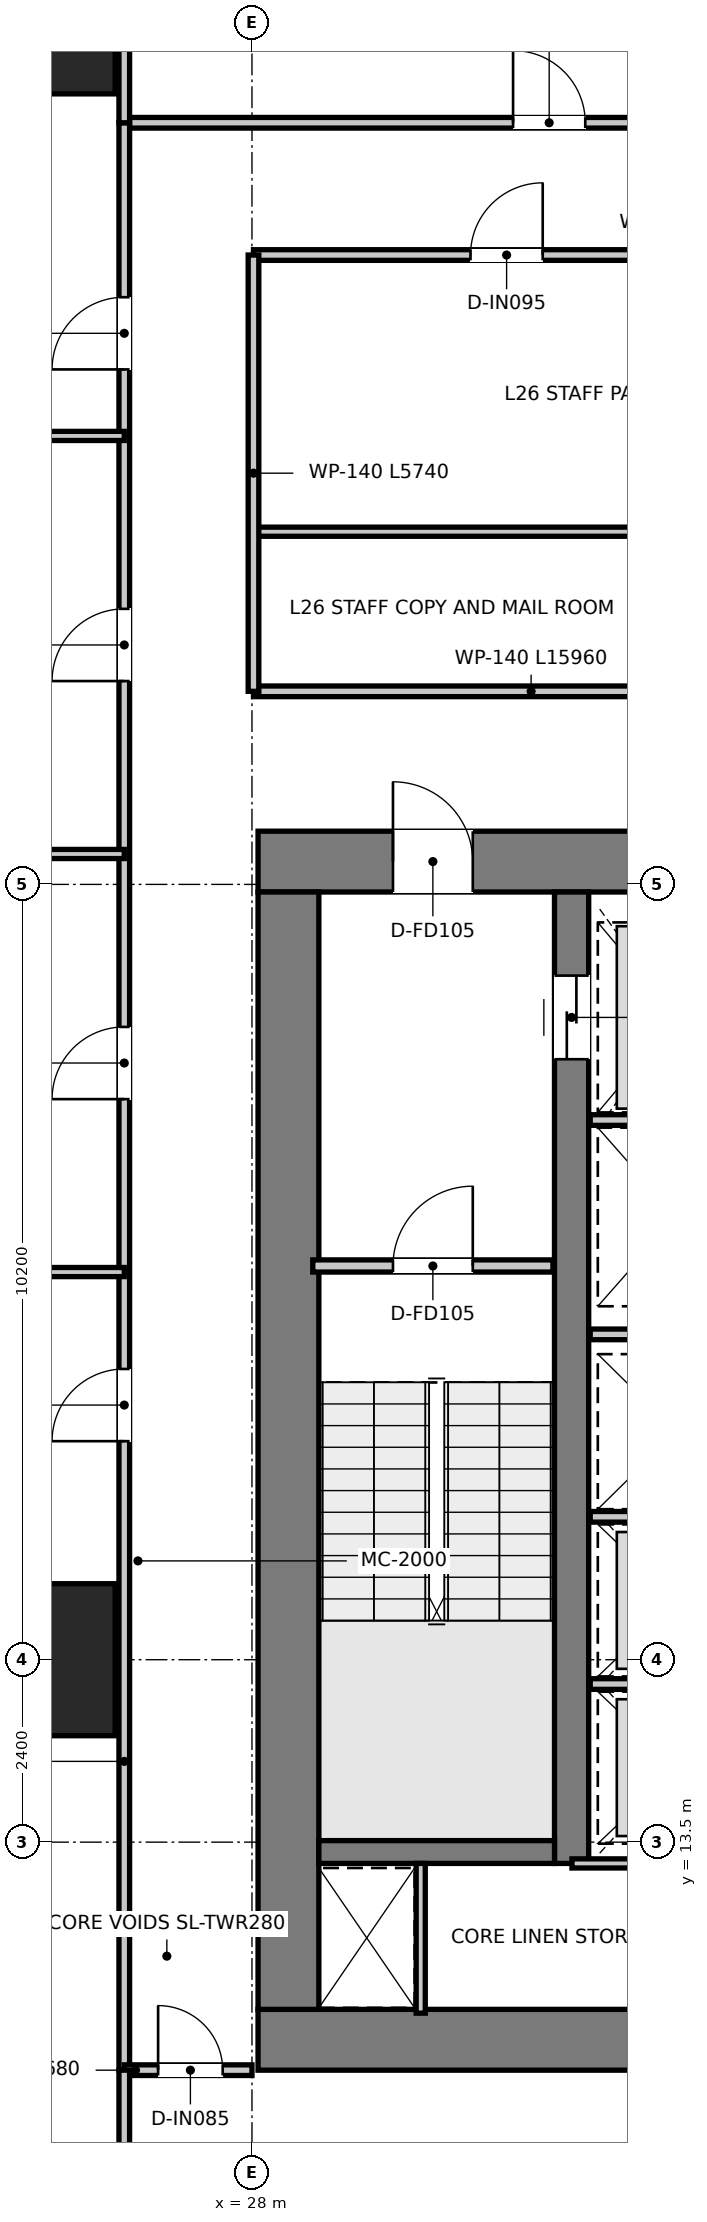
"""IFC4 building model, lengths in metres.
Left out: names, types, materials, properties, quantities, classifications, styles, units other than length and angle.
Written with IfcOpenShell. Run it as: python <this file> out.ifc"""

import sys

from ifc_helpers import new_model, si_unit, direction, frame, frame_2d, origin, origin_2d, place, context, subcontext, project, spatial, rectangle, extrude, source, transform, mapped, element, fill, save


model = new_model("IFC4")
c1 = context("Model", 3, precision=1e-05, world=origin(), true_north=direction((0.0, 1.0)))
c2 = subcontext(c1, "Body", "Model", "MODEL_VIEW")
j1 = project(units=[si_unit("LENGTHUNIT", "METRE"), si_unit("PLANEANGLEUNIT", "RADIAN")], contexts=[c1])
p1 = place(None, origin())
s1 = spatial("IfcSite", under=j1, at=p1, CompositionType="ELEMENT")
p2 = place(p1, origin())
s2 = spatial("IfcBuilding", under=s1, at=p2, CompositionType="ELEMENT")
p3 = place(p2, frame((0.0, 0.0, 109.8)))
s3 = spatial("IfcBuildingStorey", under=s2, at=p3, CompositionType="ELEMENT", Elevation=109.8)
p4 = place(p3, frame((28.08, 10.9, 0.0), z_axis=(0.0, 0.0, 1.0), x_axis=(1.0, 0.0, 0.0)))
e1 = element("IfcWall", 1, at=p4, inside=s3, PredefinedType="SHEAR", context=c2, shape_type="SweptSolid", body=[
    extrude(rectangle(XDim=15.84, YDim=0.8, at=frame_2d((7.92, 0.0))), origin(), (0.0, 0.0, 1.0), 3.95),
])
p5 = place(p3, frame((28.08, 26.4, 0.0), z_axis=(0.0, 0.0, 1.0), x_axis=(1.0, 0.0, 0.0)))
e2 = element("IfcWall", 2, at=p5, inside=s3, PredefinedType="SHEAR", context=c2, shape_type="SweptSolid", body=[
    extrude(rectangle(XDim=15.84, YDim=0.8, at=frame_2d((7.92, 0.0))), origin(), (0.0, 0.0, 1.0), 3.95),
])
p6 = place(p5, frame((7.22, 0.0, 0.0)))
e3 = element("IfcOpeningElement", 3, at=p6, cuts=e2, PredefinedType="OPENING", context=c2, shape_type="SweptSolid", body=[
    extrude(rectangle(XDim=1.4, YDim=2.2, at=frame_2d((0.7, 1.1))), frame((0.0, 0.41, 0.0), z_axis=(0.0, -1.0, 0.0), x_axis=(1.0, 0.0, 0.0)), (0.0, 0.0, 1.0), 0.82),
])
p7 = place(p5, frame((1.775, 0.0, 0.0)))
e4 = element("IfcOpeningElement", 4, at=p7, cuts=e2, PredefinedType="OPENING", context=c2, shape_type="SweptSolid", body=[
    extrude(rectangle(XDim=1.05, YDim=2.1, at=frame_2d((0.525, 1.05))), frame((0.0, 0.41, 0.0), z_axis=(0.0, -1.0, 0.0), x_axis=(1.0, 0.0, 0.0)), (0.0, 0.0, 1.0), 0.82),
])
p8 = place(p5, frame((13.015, 0.0, 0.0)))
e5 = element("IfcOpeningElement", 5, at=p8, cuts=e2, PredefinedType="OPENING", context=c2, shape_type="SweptSolid", body=[
    extrude(rectangle(XDim=1.05, YDim=2.1, at=frame_2d((0.525, 1.05))), frame((0.0, 0.41, 0.0), z_axis=(0.0, -1.0, 0.0), x_axis=(1.0, 0.0, 0.0)), (0.0, 0.0, 1.0), 0.82),
])
p9 = place(p3, frame((28.48, 11.3, 0.0), z_axis=(0.0, 0.0, 1.0), x_axis=(0.0, 1.0, 0.0)))
e6 = element("IfcWall", 6, at=p9, inside=s3, PredefinedType="SHEAR", context=c2, shape_type="SweptSolid", body=[
    extrude(rectangle(XDim=14.7, YDim=0.8, at=frame_2d((7.35, 0.0))), origin(), (0.0, 0.0, 1.0), 3.95),
])
p10 = place(p3, frame((32.205, 13.22, 0.0), z_axis=(0.0, 0.0, 1.0), x_axis=(0.0, 1.0, 0.0)))
e7 = element("IfcWall", 7, at=p10, inside=s3, PredefinedType="SHEAR", context=c2, shape_type="SweptSolid", body=[
    extrude(rectangle(XDim=12.78, YDim=0.45, at=frame_2d((6.39, 0.0))), origin(), (0.0, 0.0, 1.0), 3.95),
])
p11 = place(p10, frame((10.58, 0.0, 0.0)))
e8 = element("IfcOpeningElement", 8, at=p11, cuts=e7, PredefinedType="OPENING", context=c2, shape_type="SweptSolid", body=[
    extrude(rectangle(XDim=1.1, YDim=2.15, at=frame_2d((0.55, 1.075))), frame((0.0, 0.235, 0.0), z_axis=(0.0, -1.0, 0.0), x_axis=(1.0, 0.0, 0.0)), (0.0, 0.0, 1.0), 0.47),
])
p12 = place(p3, frame((28.88, 13.37, 0.0), z_axis=(0.0, 0.0, 1.0), x_axis=(1.0, 0.0, 0.0)))
e9 = element("IfcWall", 9, at=p12, inside=s3, PredefinedType="SHEAR", context=c2, shape_type="SweptSolid", body=[
    extrude(rectangle(XDim=3.1, YDim=0.3, at=frame_2d((1.55, 0.0))), origin(), (0.0, 0.0, 1.0), 3.95),
])
m1 = source(origin(), c2, "Body", "SweptSolid", [
    extrude(rectangle(XDim=2.0, YDim=2.0, at=origin_2d()), origin(), (0.0, 0.0, 1.0), 3.95),
])
for number, where, z_axis, x_axis in (
    (10, (25.2, 15.9, 0.0), (0.0, 0.0, 1.0), (1.0, 0.0, 0.0)),
    (11, (25.2, 37.5, 0.0), (0.0, 0.0, 1.0), (1.0, 0.0, 0.0)),
):
    element("IfcColumn", number, at=place(p3, frame(where, z_axis=z_axis, x_axis=x_axis)), inside=s3, PredefinedType="USERDEFINED", context=c2, shape_type="MappedRepresentation", body=[
        mapped(m1, transform((0.0, 0.0, 0.0), x_axis=(1.0, 0.0, 0.0), y_axis=(0.0, 1.0, 0.0), z_axis=(0.0, 0.0, 1.0), scale=1.0)),
    ])
p13 = place(p3, frame((28.8, 21.08, 0.0), z_axis=(0.0, 0.0, 1.0), x_axis=(1.0, 0.0, 0.0)))
e12 = element("IfcWall", 12, at=p13, inside=s3, PredefinedType="PARTITIONING", context=c2, shape_type="SweptSolid", body=[
    extrude(rectangle(XDim=3.16, YDim=0.16, at=frame_2d((1.58, 0.0))), origin(), (0.0, 0.0, 1.0), 3.67),
])
p14 = place(p13, frame((1.055, 0.0, 0.0)))
e13 = element("IfcOpeningElement", 13, at=p14, cuts=e12, PredefinedType="OPENING", context=c2, shape_type="SweptSolid", body=[
    extrude(rectangle(XDim=1.05, YDim=2.1, at=frame_2d((0.525, 1.05))), frame((0.0, 0.09, 0.0), z_axis=(0.0, -1.0, 0.0), x_axis=(1.0, 0.0, 0.0)), (0.0, 0.0, 1.0), 0.18),
])
p15 = place(p3, frame((32.45, 23.0, 0.0), z_axis=(0.0, 0.0, 1.0), x_axis=(1.0, 0.0, 0.0)))
e14 = element("IfcWall", 14, at=p15, inside=s3, PredefinedType="PARTITIONING", context=c2, shape_type="SweptSolid", body=[
    extrude(rectangle(XDim=2.27, YDim=0.14, at=frame_2d((1.135, 0.0))), origin(), (0.0, 0.0, 1.0), 2.67),
])
for number, where, z_axis, x_axis in (
    (15, (32.45, 17.78, 0.0), (0.0, 0.0, 1.0), (1.0, 0.0, 0.0)),
    (16, (32.45, 20.18, 0.0), (0.0, 0.0, 1.0), (1.0, 0.0, 0.0)),
    (17, (32.45, 15.58, 0.0), (0.0, 0.0, 1.0), (1.0, 0.0, 0.0)),
):
    element("IfcWall", number, at=place(p3, frame(where, z_axis=z_axis, x_axis=x_axis)), inside=s3, PredefinedType="PARTITIONING", context=c2, shape_type="SweptSolid", body=[
        extrude(rectangle(XDim=2.27, YDim=0.14, at=frame_2d((1.135, 0.0))), origin(), (0.0, 0.0, 1.0), 3.67),
    ])
p16 = place(p3, frame((30.22, 11.25, 0.0), z_axis=(0.0, 0.0, 1.0), x_axis=(0.0, 1.0, 0.0)))
e18 = element("IfcWall", 18, at=p16, inside=s3, PredefinedType="PARTITIONING", context=c2, shape_type="SweptSolid", body=[
    extrude(rectangle(XDim=1.97, YDim=0.12, at=frame_2d((0.985, 0.0))), origin(), (0.0, 0.0, 1.0), 3.67),
])
p17 = place(p3, frame((32.21, 13.22, 0.0), z_axis=(0.0, 0.0, 1.0), x_axis=(1.0, 0.0, 0.0)))
e19 = element("IfcWall", 19, at=p17, inside=s3, PredefinedType="PARTITIONING", context=c2, shape_type="SweptSolid", body=[
    extrude(rectangle(XDim=7.58, YDim=0.12, at=frame_2d((3.79, 0.0))), origin(), (0.0, 0.0, 1.0), 3.67),
])
p18 = place(p17, frame((3.365, 0.0, 0.0)))
e20 = element("IfcOpeningElement", 20, at=p18, cuts=e19, PredefinedType="OPENING", context=c2, shape_type="SweptSolid", body=[
    extrude(rectangle(XDim=0.85, YDim=2.1, at=frame_2d((0.425, 1.05))), frame((0.0, 0.07, 0.0), z_axis=(0.0, -1.0, 0.0), x_axis=(1.0, 0.0, 0.0)), (0.0, 0.0, 1.0), 0.14),
])
p19 = place(p3, frame((28.02, 28.64, 0.0), z_axis=(0.0, 0.0, 1.0), x_axis=(1.0, 0.0, 0.0)))
e21 = element("IfcWall", 21, at=p19, inside=s3, PredefinedType="PARTITIONING", context=c2, shape_type="SweptSolid", body=[
    extrude(rectangle(XDim=15.96, YDim=0.14, at=frame_2d((7.98, 0.0))), origin(), (0.0, 0.0, 1.0), 3.08),
])
p20 = place(p19, frame((7.455, 0.0, 0.0)))
e22 = element("IfcOpeningElement", 22, at=p20, cuts=e21, PredefinedType="OPENING", context=c2, shape_type="SweptSolid", body=[
    extrude(rectangle(XDim=1.05, YDim=2.15, at=frame_2d((0.525, 1.075))), frame((0.0, 0.08, 0.0), z_axis=(0.0, -1.0, 0.0), x_axis=(1.0, 0.0, 0.0)), (0.0, 0.0, 1.0), 0.16),
])
p21 = place(p3, frame((28.02, 30.74, 0.0), z_axis=(0.0, 0.0, 1.0), x_axis=(1.0, 0.0, 0.0)))
e23 = element("IfcWall", 23, at=p21, inside=s3, PredefinedType="PARTITIONING", context=c2, shape_type="SweptSolid", body=[
    extrude(rectangle(XDim=15.96, YDim=0.12, at=frame_2d((7.98, 0.0))), origin(), (0.0, 0.0, 1.0), 3.08),
])
p22 = place(p3, frame((28.02, 34.38, 0.0), z_axis=(0.0, 0.0, 1.0), x_axis=(1.0, 0.0, 0.0)))
e24 = element("IfcWall", 24, at=p22, inside=s3, PredefinedType="PARTITIONING", context=c2, shape_type="SweptSolid", body=[
    extrude(rectangle(XDim=15.96, YDim=0.14, at=frame_2d((7.98, 0.0))), origin(), (0.0, 0.0, 1.0), 3.08),
])
p23 = place(p22, frame((7.83, 0.0, 0.0)))
e25 = element("IfcOpeningElement", 25, at=p23, cuts=e24, PredefinedType="OPENING", context=c2, shape_type="SweptSolid", body=[
    extrude(rectangle(XDim=0.9, YDim=2.1, at=frame_2d((0.45, 1.05))), frame((0.0, 0.08, 0.0), z_axis=(0.0, -1.0, 0.0), x_axis=(1.0, 0.0, 0.0)), (0.0, 0.0, 1.0), 0.16),
])
p24 = place(p22, frame((11.03, 0.0, 0.0)))
e26 = element("IfcOpeningElement", 26, at=p24, cuts=e24, PredefinedType="OPENING", context=c2, shape_type="SweptSolid", body=[
    extrude(rectangle(XDim=0.9, YDim=2.1, at=frame_2d((0.45, 1.05))), frame((0.0, 0.08, 0.0), z_axis=(0.0, -1.0, 0.0), x_axis=(1.0, 0.0, 0.0)), (0.0, 0.0, 1.0), 0.16),
])
p25 = place(p22, frame((14.055, 0.0, 0.0)))
e27 = element("IfcOpeningElement", 27, at=p25, cuts=e24, PredefinedType="OPENING", context=c2, shape_type="SweptSolid", body=[
    extrude(rectangle(XDim=0.95, YDim=2.1, at=frame_2d((0.475, 1.05))), frame((0.0, 0.08, 0.0), z_axis=(0.0, -1.0, 0.0), x_axis=(1.0, 0.0, 0.0)), (0.0, 0.0, 1.0), 0.16),
])
p26 = place(p22, frame((2.855, 0.0, 0.0)))
e28 = element("IfcOpeningElement", 28, at=p26, cuts=e24, PredefinedType="OPENING", context=c2, shape_type="SweptSolid", body=[
    extrude(rectangle(XDim=0.95, YDim=2.1, at=frame_2d((0.475, 1.05))), frame((0.0, 0.08, 0.0), z_axis=(0.0, -1.0, 0.0), x_axis=(1.0, 0.0, 0.0)), (0.0, 0.0, 1.0), 0.16),
])
p27 = place(p3, frame((28.02, 28.64, 0.0), z_axis=(0.0, 0.0, 1.0), x_axis=(0.0, 1.0, 0.0)))
e29 = element("IfcWall", 29, at=p27, inside=s3, PredefinedType="PARTITIONING", context=c2, shape_type="SweptSolid", body=[
    extrude(rectangle(XDim=5.74, YDim=0.14, at=frame_2d((2.87, 0.0))), origin(), (0.0, 0.0, 1.0), 3.27),
])
p28 = place(p3, frame((26.32, 36.12, 0.0), z_axis=(0.0, 0.0, 1.0), x_axis=(1.0, 0.0, 0.0)))
e30 = element("IfcWall", 30, at=p28, inside=s3, PredefinedType="PARTITIONING", context=c2, shape_type="SweptSolid", body=[
    extrude(rectangle(XDim=19.36, YDim=0.14, at=frame_2d((9.68, 0.0))), origin(), (0.0, 0.0, 1.0), 3.08),
])
p29 = place(p28, frame((5.115, 0.0, 0.0)))
e31 = element("IfcOpeningElement", 31, at=p29, cuts=e30, PredefinedType="OPENING", context=c2, shape_type="SweptSolid", body=[
    extrude(rectangle(XDim=0.95, YDim=2.1, at=frame_2d((0.475, 1.05))), frame((0.0, 0.08, 0.0), z_axis=(0.0, -1.0, 0.0), x_axis=(1.0, 0.0, 0.0)), (0.0, 0.0, 1.0), 0.16),
])
p30 = place(p28, frame((14.795, 0.0, 0.0)))
e32 = element("IfcOpeningElement", 32, at=p30, cuts=e30, PredefinedType="OPENING", context=c2, shape_type="SweptSolid", body=[
    extrude(rectangle(XDim=0.95, YDim=2.1, at=frame_2d((0.475, 1.05))), frame((0.0, 0.08, 0.0), z_axis=(0.0, -1.0, 0.0), x_axis=(1.0, 0.0, 0.0)), (0.0, 0.0, 1.0), 0.16),
])
p31 = place(p3, frame((26.32, 10.5, 0.0), z_axis=(0.0, 0.0, 1.0), x_axis=(0.0, 1.0, 0.0)))
e33 = element("IfcWall", 33, at=p31, inside=s3, PredefinedType="PARTITIONING", context=c2, shape_type="SweptSolid", body=[
    extrude(rectangle(XDim=25.62, YDim=0.14, at=frame_2d((12.81, 0.0))), origin(), (0.0, 0.0, 1.0), 2.97),
])
p32 = place(p31, frame((8.275, 0.0, 0.0)))
e34 = element("IfcOpeningElement", 34, at=p32, cuts=e33, PredefinedType="OPENING", context=c2, shape_type="SweptSolid", body=[
    extrude(rectangle(XDim=0.95, YDim=2.1, at=frame_2d((0.475, 1.05))), frame((0.0, 0.08, 0.0), z_axis=(0.0, -1.0, 0.0), x_axis=(1.0, 0.0, 0.0)), (0.0, 0.0, 1.0), 0.16),
])
p33 = place(p31, frame((12.775, 0.0, 0.0)))
e35 = element("IfcOpeningElement", 35, at=p33, cuts=e33, PredefinedType="OPENING", context=c2, shape_type="SweptSolid", body=[
    extrude(rectangle(XDim=0.95, YDim=2.1, at=frame_2d((0.475, 1.05))), frame((0.0, 0.08, 0.0), z_axis=(0.0, -1.0, 0.0), x_axis=(1.0, 0.0, 0.0)), (0.0, 0.0, 1.0), 0.16),
])
p34 = place(p31, frame((18.275, 0.0, 0.0)))
e36 = element("IfcOpeningElement", 36, at=p34, cuts=e33, PredefinedType="OPENING", context=c2, shape_type="SweptSolid", body=[
    extrude(rectangle(XDim=0.95, YDim=2.1, at=frame_2d((0.475, 1.05))), frame((0.0, 0.08, 0.0), z_axis=(0.0, -1.0, 0.0), x_axis=(1.0, 0.0, 0.0)), (0.0, 0.0, 1.0), 0.16),
])
p35 = place(p31, frame((22.375, 0.0, 0.0)))
e37 = element("IfcOpeningElement", 37, at=p35, cuts=e33, PredefinedType="OPENING", context=c2, shape_type="SweptSolid", body=[
    extrude(rectangle(XDim=0.95, YDim=2.1, at=frame_2d((0.475, 1.05))), frame((0.0, 0.08, 0.0), z_axis=(0.0, -1.0, 0.0), x_axis=(1.0, 0.0, 0.0)), (0.0, 0.0, 1.0), 0.16),
])
p36 = place(p3, frame((26.32, 10.5, 0.0), z_axis=(0.0, 0.0, 1.0), x_axis=(1.0, 0.0, 0.0)))
e38 = element("IfcWall", 38, at=p36, inside=s3, PredefinedType="PARTITIONING", context=c2, shape_type="SweptSolid", body=[
    extrude(rectangle(XDim=1.68, YDim=0.14, at=frame_2d((0.84, 0.0))), origin(), (0.0, 0.0, 1.0), 3.67),
])
p37 = place(p36, frame((0.445, 0.0, 0.0)))
e39 = element("IfcOpeningElement", 39, at=p37, cuts=e38, PredefinedType="OPENING", context=c2, shape_type="SweptSolid", body=[
    extrude(rectangle(XDim=0.85, YDim=2.1, at=frame_2d((0.425, 1.05))), frame((0.0, 0.08, 0.0), z_axis=(0.0, -1.0, 0.0), x_axis=(1.0, 0.0, 0.0)), (0.0, 0.0, 1.0), 0.16),
])
p38 = place(p3, frame((26.32, 36.12, 0.0), z_axis=(0.0, 0.0, 1.0), x_axis=(0.0, 1.0, 0.0)))
e40 = element("IfcWall", 40, at=p38, inside=s3, PredefinedType="PARTITIONING", context=c2, shape_type="SweptSolid", body=[
    extrude(rectangle(XDim=17.914, YDim=0.14, at=frame_2d((8.957, 0.0))), origin(), (0.0, 0.0, 1.0), 2.97),
])
p39 = place(p3, frame((26.32, 5.284, 0.0), z_axis=(0.0, 0.0, 1.0), x_axis=(0.0, 1.0, 0.0)))
e41 = element("IfcWall", 41, at=p39, inside=s3, PredefinedType="PARTITIONING", context=c2, shape_type="SweptSolid", body=[
    extrude(rectangle(XDim=5.216, YDim=0.14, at=frame_2d((2.608, 0.0))), origin(), (0.0, 0.0, 1.0), 3.67),
])
p40 = place(p3, frame((9.882, 21.0, 0.0), z_axis=(0.0, 0.0, 1.0), x_axis=(1.0, 0.0, 0.0)))
e42 = element("IfcWall", 42, at=p40, inside=s3, PredefinedType="PARTITIONING", context=c2, shape_type="SweptSolid", body=[
    extrude(rectangle(XDim=16.438, YDim=0.12, at=frame_2d((8.219, 0.0))), origin(), (0.0, 0.0, 1.0), 2.97),
])
p41 = place(p3, frame((11.564, 26.5, 0.0), z_axis=(0.0, 0.0, 1.0), x_axis=(1.0, 0.0, 0.0)))
e43 = element("IfcWall", 43, at=p41, inside=s3, PredefinedType="PARTITIONING", context=c2, shape_type="SweptSolid", body=[
    extrude(rectangle(XDim=14.756, YDim=0.12, at=frame_2d((7.378, 0.0))), origin(), (0.0, 0.0, 1.0), 2.97),
])
p42 = place(p3, frame((13.245, 32.0, 0.0), z_axis=(0.0, 0.0, 1.0), x_axis=(1.0, 0.0, 0.0)))
e44 = element("IfcWall", 44, at=p42, inside=s3, PredefinedType="PARTITIONING", context=c2, shape_type="SweptSolid", body=[
    extrude(rectangle(XDim=13.075, YDim=0.12, at=frame_2d((6.537, 0.0))), origin(), (0.0, 0.0, 1.0), 2.97),
])
p43 = place(p14, origin())
e45 = element("IfcDoor", 45, at=p43, inside=s3, OperationType="SINGLE_SWING_RIGHT", PredefinedType="DOOR", context=c2, shape_type="SweptSolid", body=[
    extrude(rectangle(XDim=1.05, YDim=2.1, at=frame_2d((0.525, 1.05))), frame((0.0, 0.025, 0.0), z_axis=(0.0, -1.0, 0.0), x_axis=(1.0, 0.0, 0.0)), (0.0, 0.0, 1.0), 0.05),
])
fill(e13, e45)
p44 = place(p7, origin())
e46 = element("IfcDoor", 46, at=p44, inside=s3, OperationType="SINGLE_SWING_LEFT", PredefinedType="DOOR", context=c2, shape_type="SweptSolid", body=[
    extrude(rectangle(XDim=1.05, YDim=2.1, at=frame_2d((0.525, 1.05))), frame((0.0, 0.025, 0.0), z_axis=(0.0, -1.0, 0.0), x_axis=(1.0, 0.0, 0.0)), (0.0, 0.0, 1.0), 0.05),
])
fill(e4, e46)
p45 = place(p11, origin())
e47 = element("IfcDoor", 47, at=p45, inside=s3, OperationType="DOUBLE_DOOR_SLIDING", PredefinedType="DOOR", context=c2, shape_type="SweptSolid", body=[
    extrude(rectangle(XDim=1.1, YDim=2.15, at=frame_2d((0.55, 1.075))), frame((0.0, 0.025, 0.0), z_axis=(0.0, -1.0, 0.0), x_axis=(1.0, 0.0, 0.0)), (0.0, 0.0, 1.0), 0.05),
])
fill(e8, e47)
p46 = place(p26, origin())
e48 = element("IfcDoor", 48, at=p46, inside=s3, OperationType="SINGLE_SWING_RIGHT", PredefinedType="DOOR", context=c2, shape_type="SweptSolid", body=[
    extrude(rectangle(XDim=0.95, YDim=2.1, at=frame_2d((0.475, 1.05))), frame((0.0, 0.025, 0.0), z_axis=(0.0, -1.0, 0.0), x_axis=(1.0, 0.0, 0.0)), (0.0, 0.0, 1.0), 0.05),
])
fill(e28, e48)
p47 = place(p29, origin())
e49 = element("IfcDoor", 49, at=p47, inside=s3, OperationType="SINGLE_SWING_LEFT", PredefinedType="DOOR", context=c2, shape_type="SweptSolid", body=[
    extrude(rectangle(XDim=0.95, YDim=2.1, at=frame_2d((0.475, 1.05))), frame((0.0, 0.025, 0.0), z_axis=(0.0, -1.0, 0.0), x_axis=(1.0, 0.0, 0.0)), (0.0, 0.0, 1.0), 0.05),
])
fill(e31, e49)
p48 = place(p32, origin())
e50 = element("IfcDoor", 50, at=p48, inside=s3, OperationType="SINGLE_SWING_LEFT", PredefinedType="DOOR", context=c2, shape_type="SweptSolid", body=[
    extrude(rectangle(XDim=0.95, YDim=2.1, at=frame_2d((0.475, 1.05))), frame((0.0, 0.025, 0.0), z_axis=(0.0, -1.0, 0.0), x_axis=(1.0, 0.0, 0.0)), (0.0, 0.0, 1.0), 0.05),
])
fill(e34, e50)
p49 = place(p33, origin())
e51 = element("IfcDoor", 51, at=p49, inside=s3, OperationType="SINGLE_SWING_LEFT", PredefinedType="DOOR", context=c2, shape_type="SweptSolid", body=[
    extrude(rectangle(XDim=0.95, YDim=2.1, at=frame_2d((0.475, 1.05))), frame((0.0, 0.025, 0.0), z_axis=(0.0, -1.0, 0.0), x_axis=(1.0, 0.0, 0.0)), (0.0, 0.0, 1.0), 0.05),
])
fill(e35, e51)
p50 = place(p34, origin())
e52 = element("IfcDoor", 52, at=p50, inside=s3, OperationType="SINGLE_SWING_LEFT", PredefinedType="DOOR", context=c2, shape_type="SweptSolid", body=[
    extrude(rectangle(XDim=0.95, YDim=2.1, at=frame_2d((0.475, 1.05))), frame((0.0, 0.025, 0.0), z_axis=(0.0, -1.0, 0.0), x_axis=(1.0, 0.0, 0.0)), (0.0, 0.0, 1.0), 0.05),
])
fill(e36, e52)
p51 = place(p35, origin())
e53 = element("IfcDoor", 53, at=p51, inside=s3, OperationType="SINGLE_SWING_LEFT", PredefinedType="DOOR", context=c2, shape_type="SweptSolid", body=[
    extrude(rectangle(XDim=0.95, YDim=2.1, at=frame_2d((0.475, 1.05))), frame((0.0, 0.025, 0.0), z_axis=(0.0, -1.0, 0.0), x_axis=(1.0, 0.0, 0.0)), (0.0, 0.0, 1.0), 0.05),
])
fill(e37, e53)
p52 = place(p37, origin())
e54 = element("IfcDoor", 54, at=p52, inside=s3, OperationType="SINGLE_SWING_LEFT", PredefinedType="DOOR", context=c2, shape_type="SweptSolid", body=[
    extrude(rectangle(XDim=0.85, YDim=2.1, at=frame_2d((0.425, 1.05))), frame((0.0, 0.025, 0.0), z_axis=(0.0, -1.0, 0.0), x_axis=(1.0, 0.0, 0.0)), (0.0, 0.0, 1.0), 0.05),
])
fill(e39, e54)
save(model, sys.argv[1])
